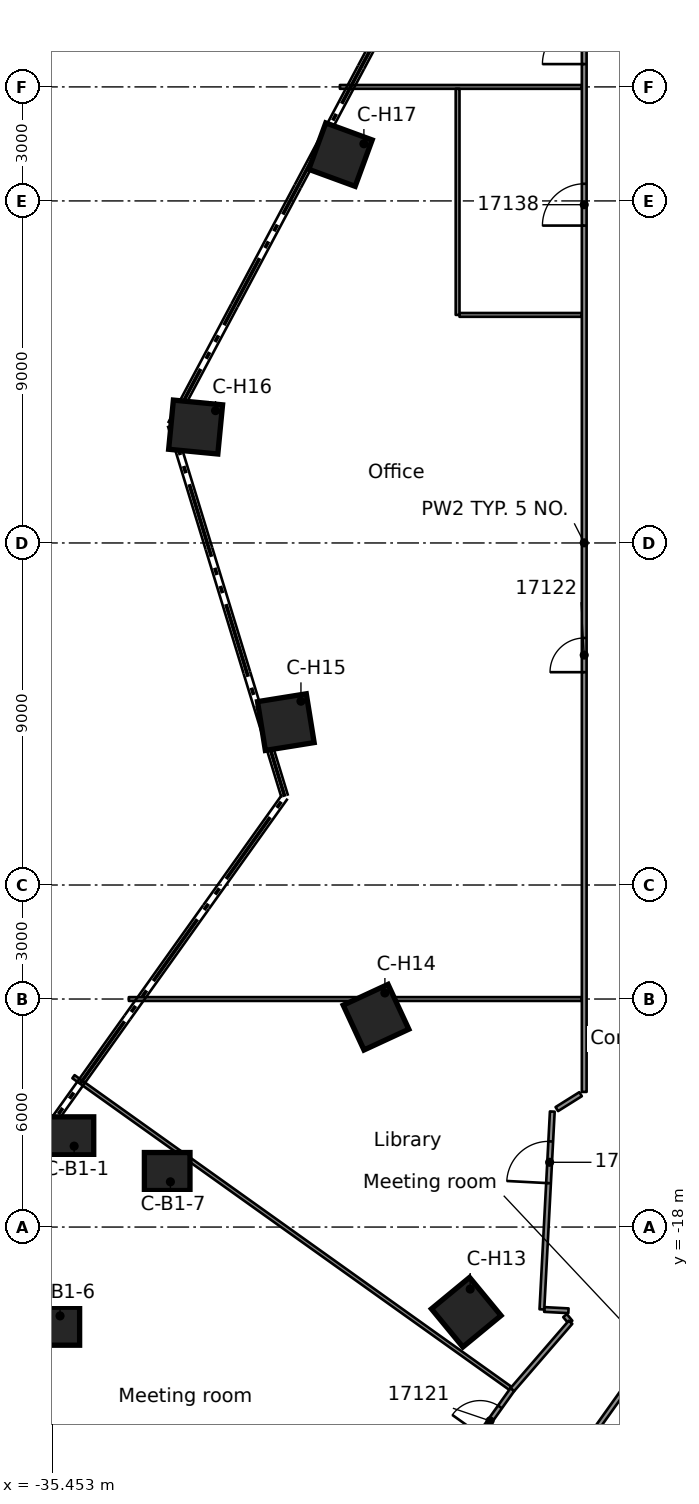
"""IFC4 building model, lengths in metres.
Left out: names, types, materials, properties, quantities, classifications, styles, units other than length and angle.
Written with IfcOpenShell. Run it as: python <this file> out.ifc"""

import sys

from ifc_helpers import new_model, si_unit, direction, frame, frame_2d, origin, origin_2d, place, context, subcontext, project, spatial, rectangle, extrude, element, fill, save


model = new_model("IFC4")
c1 = context("Model", 3, precision=1e-05, world=origin(), true_north=direction((0.0, 1.0)))
c2 = subcontext(c1, "Body", "Model", "MODEL_VIEW")
j1 = project(units=[si_unit("LENGTHUNIT", "METRE"), si_unit("PLANEANGLEUNIT", "RADIAN")], contexts=[c1])
p1 = place(None, origin())
s1 = spatial("IfcSite", under=j1, at=p1, CompositionType="ELEMENT")
p2 = place(p1, origin())
s2 = spatial("IfcBuilding", under=s1, at=p2, CompositionType="ELEMENT")
p3 = place(p2, frame((0.0, 0.0, 84.2)))
s3 = spatial("IfcBuildingStorey", under=s2, at=p3, CompositionType="ELEMENT", Elevation=84.2)
for number, where, z_axis, x_axis in (
    (1, (-34.957, -15.6, 0.0), (0.0, 0.0, 1.0), (1.0, 0.0, 0.0)),
    (2, (-35.328, -20.609, 0.0), (0.0, 0.0, 1.0), (1.0, 0.0, 0.0)),
    (3, (-32.424, -16.539, 0.0), (0.0, 0.0, 1.0), (1.0, 0.0, 0.0)),
):
    element("IfcColumn", number, at=place(p3, frame(where, z_axis=z_axis, x_axis=x_axis)), inside=s3, PredefinedType="COLUMN", context=c2, shape_type="SweptSolid", body=[
        extrude(rectangle(XDim=1.2, YDim=1.0, at=origin_2d()), origin(), (0.0, 0.0, 1.0), 3.5),
    ])
for number, where, z_axis, x_axis in (
    (4, (-24.555, -20.241, 0.0), (0.0, 0.0, 1.0), (-0.772, -0.636, 0.0)),
    (5, (-26.929, -12.478, 0.0), (0.0, 0.0, 1.0), (-0.907, -0.42, 0.0)),
    (6, (-29.302, -4.714, 0.0), (0.0, 0.0, 1.0), (-0.987, -0.159, 0.0)),
    (7, (-31.676, 3.05, 0.0), (0.0, 0.0, 1.0), (-0.995, 0.096, 0.0)),
    (8, (-27.864, 10.218, 0.0), (0.0, 0.0, 1.0), (-0.939, 0.344, 0.0)),
):
    element("IfcColumn", number, at=place(p3, frame(where, z_axis=z_axis, x_axis=x_axis)), inside=s3, PredefinedType="COLUMN", context=c2, shape_type="SweptSolid", body=[
        extrude(rectangle(XDim=1.3, YDim=1.3, at=origin_2d()), origin(), (0.0, 0.0, 1.0), 3.5),
    ])
p4 = place(p3, frame((-21.955, -20.33, 0.0), z_axis=(0.0, 0.0, 1.0), x_axis=(0.635933908165, -0.771743522451, 0.0)))
e9 = element("IfcWall", 9, at=p4, inside=s3, PredefinedType="PARTITIONING", context=c2, shape_type="SweptSolid", body=[
    extrude(rectangle(XDim=0.227, YDim=0.125, at=frame_2d((0.113, 0.0))), origin(), (0.0, 0.0, 1.0), 3.08),
])
p5 = place(p3, frame((-40.875, -22.433, 0.0), z_axis=(0.0, 0.0, 1.0), x_axis=(0.814073113892, -0.580762399987, 0.0)))
e10 = element("IfcWall", 10, at=p5, inside=s3, PredefinedType="PARTITIONING", context=c2, shape_type="SweptSolid", body=[
    extrude(rectangle(XDim=14.128, YDim=0.1, at=frame_2d((7.064, 0.0))), origin(), (0.0, 0.0, 1.0), 3.08),
])
p6 = place(p3, frame((-34.89, -14.043, 0.0), z_axis=(0.0, 0.0, 1.0), x_axis=(0.814114134431, -0.580704895898, 0.0)))
e11 = element("IfcWall", 11, at=p6, inside=s3, PredefinedType="PARTITIONING", context=c2, shape_type="SweptSolid", body=[
    extrude(rectangle(XDim=14.121, YDim=0.1, at=frame_2d((7.06, 0.0))), origin(), (0.0, 0.0, 1.0), 3.08),
])
p7 = place(p3, frame((-22.501, -20.169, 0.0), z_axis=(0.0, 0.0, 1.0), x_axis=(0.998579445261, -0.05328312587, 0.0)))
e12 = element("IfcWall", 12, at=p7, inside=s3, PredefinedType="PARTITIONING", context=c2, shape_type="SweptSolid", body=[
    extrude(rectangle(XDim=0.637, YDim=0.125, at=frame_2d((0.318, 0.0))), origin(), (0.0, 0.0, 1.0), 3.08),
])
p8 = place(p3, frame((-33.433, -12.0, 0.0), z_axis=(0.0, 0.0, 1.0), x_axis=(1.0, 0.0, 0.0)))
e13 = element("IfcWall", 13, at=p8, inside=s3, PredefinedType="PARTITIONING", context=c2, shape_type="SweptSolid", body=[
    extrude(rectangle(XDim=11.921, YDim=0.1, at=frame_2d((5.96, 0.0))), origin(), (0.0, 0.0, 1.0), 3.08),
])
p9 = place(p3, frame((-24.732, 6.001, 0.0), z_axis=(0.0, 0.0, 1.0), x_axis=(1.0, 0.0, 0.0)))
e14 = element("IfcWall", 14, at=p9, inside=s3, PredefinedType="PARTITIONING", context=c2, shape_type="SweptSolid", body=[
    extrude(rectangle(XDim=3.22, YDim=0.1, at=frame_2d((1.61, 0.0))), origin(), (0.0, 0.0, 1.0), 3.08),
])
p10 = place(p3, frame((-27.879, 12.0, 0.0), z_axis=(0.0, 0.0, 1.0), x_axis=(1.0, 0.0, 0.0)))
e15 = element("IfcWall", 15, at=p10, inside=s3, PredefinedType="PARTITIONING", context=c2, shape_type="SweptSolid", body=[
    extrude(rectangle(XDim=6.367, YDim=0.1, at=frame_2d((3.184, 0.0))), origin(), (0.0, 0.0, 1.0), 3.08),
])
p11 = place(p3, frame((-22.171, -14.896, 0.0), z_axis=(0.0, 0.0, 1.0), x_axis=(0.847104786715, 0.53142589354, 0.0)))
e16 = element("IfcWall", 16, at=p11, inside=s3, PredefinedType="PARTITIONING", context=c2, shape_type="SweptSolid", body=[
    extrude(rectangle(XDim=0.738, YDim=0.125, at=frame_2d((0.369, 0.0))), origin(), (0.0, 0.0, 1.0), 3.08),
])
p12 = place(p3, frame((-21.811, -20.505, 0.0), z_axis=(0.0, 0.0, 1.0), x_axis=(-0.65355749983, -0.756876868728, 0.0)))
e17 = element("IfcWall", 17, at=p12, inside=s3, PredefinedType="PARTITIONING", context=c2, shape_type="SweptSolid", body=[
    extrude(rectangle(XDim=2.344, YDim=0.125, at=frame_2d((1.172, 0.0))), origin(), (0.0, 0.0, 1.0), 3.08),
])
p13 = place(p3, frame((-19.504, -21.026, 0.0), z_axis=(0.0, 0.0, 1.0), x_axis=(-0.580099628217, -0.814545530552, 0.0)))
e18 = element("IfcWall", 18, at=p13, inside=s3, PredefinedType="PARTITIONING", context=c2, shape_type="SweptSolid", body=[
    extrude(rectangle(XDim=13.556, YDim=0.125, at=frame_2d((6.778, 0.0))), origin(), (0.0, 0.0, 1.0), 3.08),
])
p14 = place(p13, frame((7.85, 0.0, 0.0)))
e19 = element("IfcOpeningElement", 19, at=p14, cuts=e18, PredefinedType="OPENING", context=c2, shape_type="SweptSolid", body=[
    extrude(rectangle(XDim=0.9, YDim=2.1, at=frame_2d((0.45, 1.05))), frame((0.0, 0.073, 0.0), z_axis=(0.0, -1.0, 0.0), x_axis=(1.0, 0.0, 0.0)), (0.0, 0.0, 1.0), 0.145),
])
p15 = place(p3, frame((-29.323, -30.674, 0.0), z_axis=(0.0, 0.0, 1.0), x_axis=(0.580180127153, 0.814488195161, 0.0)))
e20 = element("IfcWall", 20, at=p15, inside=s3, PredefinedType="PARTITIONING", context=c2, shape_type="SweptSolid", body=[
    extrude(rectangle(XDim=10.307, YDim=0.125, at=frame_2d((5.154, 0.0))), origin(), (0.0, 0.0, 1.0), 3.08),
])
p16 = place(p15, frame((4.6, 0.0, 0.0)))
e21 = element("IfcOpeningElement", 21, at=p16, cuts=e20, PredefinedType="OPENING", context=c2, shape_type="SweptSolid", body=[
    extrude(rectangle(XDim=0.9, YDim=2.1, at=frame_2d((0.45, 1.05))), frame((0.0, 0.073, 0.0), z_axis=(0.0, -1.0, 0.0), x_axis=(1.0, 0.0, 0.0)), (0.0, 0.0, 1.0), 0.145),
])
p17 = place(p15, frame((8.85, 0.0, 0.0)))
e22 = element("IfcOpeningElement", 22, at=p17, cuts=e20, PredefinedType="OPENING", context=c2, shape_type="SweptSolid", body=[
    extrude(rectangle(XDim=0.9, YDim=2.1, at=frame_2d((0.45, 1.05))), frame((0.0, 0.073, 0.0), z_axis=(0.0, -1.0, 0.0), x_axis=(1.0, 0.0, 0.0)), (0.0, 0.0, 1.0), 0.145),
])
p18 = place(p3, frame((-22.564, -20.166, 0.0), z_axis=(0.0, 0.0, 1.0), x_axis=(0.052553916269, 0.998618088102, 0.0)))
e23 = element("IfcWall", 23, at=p18, inside=s3, PredefinedType="PARTITIONING", context=c2, shape_type="SweptSolid", body=[
    extrude(rectangle(XDim=5.212, YDim=0.125, at=frame_2d((2.606, 0.0))), origin(), (0.0, 0.0, 1.0), 3.08),
])
p19 = place(p18, frame((3.325, 0.0, 0.0)))
e24 = element("IfcOpeningElement", 24, at=p19, cuts=e23, PredefinedType="OPENING", context=c2, shape_type="SweptSolid", body=[
    extrude(rectangle(XDim=1.1, YDim=2.1, at=frame_2d((0.55, 1.05))), frame((0.0, 0.073, 0.0), z_axis=(0.0, -1.0, 0.0), x_axis=(1.0, 0.0, 0.0)), (0.0, 0.0, 1.0), 0.145),
])
p20 = place(p3, frame((-21.45, -14.444, 0.0), z_axis=(0.0, 0.0, 1.0), x_axis=(0.0, 1.0, 0.0)))
e25 = element("IfcWall", 25, at=p20, inside=s3, PredefinedType="PARTITIONING", context=c2, shape_type="SweptSolid", body=[
    extrude(rectangle(XDim=28.895, YDim=0.125, at=frame_2d((14.448, 0.0))), origin(), (0.0, 0.0, 1.0), 3.08),
])
p21 = place(p20, frame((11.044, 0.0, 0.0)))
e26 = element("IfcOpeningElement", 26, at=p21, cuts=e25, PredefinedType="OPENING", context=c2, shape_type="SweptSolid", body=[
    extrude(rectangle(XDim=0.9, YDim=2.1, at=frame_2d((0.45, 1.05))), frame((0.0, 0.073, 0.0), z_axis=(0.0, -1.0, 0.0), x_axis=(1.0, 0.0, 0.0)), (0.0, 0.0, 1.0), 0.145),
])
p22 = place(p20, frame((27.044, 0.0, 0.0)))
e27 = element("IfcOpeningElement", 27, at=p22, cuts=e25, PredefinedType="OPENING", context=c2, shape_type="SweptSolid", body=[
    extrude(rectangle(XDim=1.1, YDim=2.1, at=frame_2d((0.55, 1.05))), frame((0.0, 0.073, 0.0), z_axis=(0.0, -1.0, 0.0), x_axis=(1.0, 0.0, 0.0)), (0.0, 0.0, 1.0), 0.145),
])
p23 = place(p20, frame((22.795, 0.0, 0.0)))
e28 = element("IfcOpeningElement", 28, at=p23, cuts=e25, PredefinedType="OPENING", context=c2, shape_type="SweptSolid", body=[
    extrude(rectangle(XDim=1.1, YDim=2.1, at=frame_2d((0.55, 1.05))), frame((0.0, 0.073, 0.0), z_axis=(0.0, -1.0, 0.0), x_axis=(1.0, 0.0, 0.0)), (0.0, 0.0, 1.0), 0.145),
])
p24 = place(p3, frame((-24.782, 6.001, 0.0), z_axis=(0.0, 0.0, 1.0), x_axis=(0.0, 1.0, 0.0)))
e29 = element("IfcWall", 29, at=p24, inside=s3, PredefinedType="PARTITIONING", context=c2, shape_type="SweptSolid", body=[
    extrude(rectangle(XDim=5.949, YDim=0.1, at=frame_2d((2.975, 0.0))), origin(), (0.0, 0.0, 1.0), 3.08),
])
p25 = place(p17, origin())
e30 = element("IfcDoor", 30, at=p25, inside=s3, OperationType="SINGLE_SWING_RIGHT", PredefinedType="DOOR", context=c2, shape_type="SweptSolid", body=[
    extrude(rectangle(XDim=0.9, YDim=2.1, at=frame_2d((0.45, 1.05))), frame((0.0, 0.025, 0.0), z_axis=(0.0, -1.0, 0.0), x_axis=(1.0, 0.0, 0.0)), (0.0, 0.0, 1.0), 0.05),
])
fill(e22, e30)
p26 = place(p21, origin())
e31 = element("IfcDoor", 31, at=p26, inside=s3, OperationType="SINGLE_SWING_LEFT", PredefinedType="DOOR", context=c2, shape_type="SweptSolid", body=[
    extrude(rectangle(XDim=0.9, YDim=2.1, at=frame_2d((0.45, 1.05))), frame((0.0, 0.025, 0.0), z_axis=(0.0, -1.0, 0.0), x_axis=(1.0, 0.0, 0.0)), (0.0, 0.0, 1.0), 0.05),
])
fill(e26, e31)
p27 = place(p19, origin())
e32 = element("IfcDoor", 32, at=p27, inside=s3, OperationType="SINGLE_SWING_RIGHT", PredefinedType="DOOR", context=c2, shape_type="SweptSolid", body=[
    extrude(rectangle(XDim=1.1, YDim=2.1, at=frame_2d((0.55, 1.05))), frame((0.0, 0.025, 0.0), z_axis=(0.0, -1.0, 0.0), x_axis=(1.0, 0.0, 0.0)), (0.0, 0.0, 1.0), 0.05),
])
fill(e24, e32)
p28 = place(p22, origin())
e33 = element("IfcDoor", 33, at=p28, inside=s3, OperationType="SINGLE_SWING_RIGHT", PredefinedType="DOOR", context=c2, shape_type="SweptSolid", body=[
    extrude(rectangle(XDim=1.1, YDim=2.1, at=frame_2d((0.55, 1.05))), frame((0.0, 0.025, 0.0), z_axis=(0.0, -1.0, 0.0), x_axis=(1.0, 0.0, 0.0)), (0.0, 0.0, 1.0), 0.05),
])
fill(e27, e33)
p29 = place(p23, origin())
e34 = element("IfcDoor", 34, at=p29, inside=s3, OperationType="SINGLE_SWING_RIGHT", PredefinedType="DOOR", context=c2, shape_type="SweptSolid", body=[
    extrude(rectangle(XDim=1.1, YDim=2.1, at=frame_2d((0.55, 1.05))), frame((0.0, 0.025, 0.0), z_axis=(0.0, -1.0, 0.0), x_axis=(1.0, 0.0, 0.0)), (0.0, 0.0, 1.0), 0.05),
])
fill(e28, e34)
save(model, sys.argv[1])
